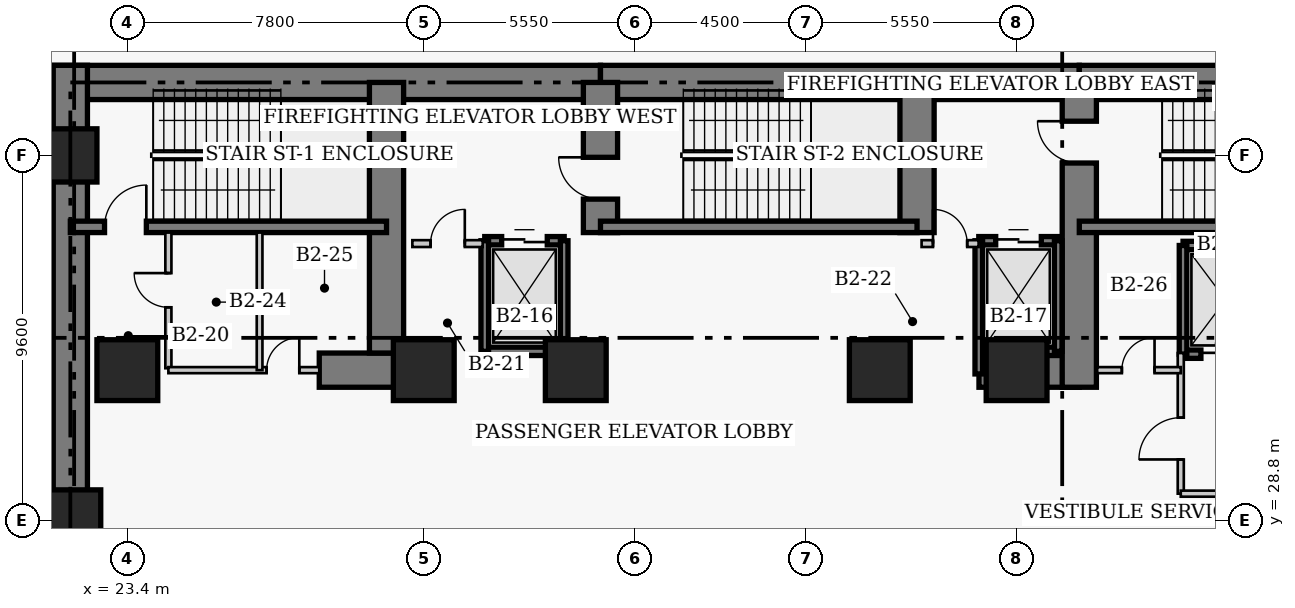
"""IFC4 building model, lengths in metres.
Left out: names, types, materials, properties, quantities, classifications, styles, units other than length and angle.
Written with IfcOpenShell. Run it as: python <this file> out.ifc"""

import sys

from ifc_helpers import new_model, si_unit, direction, frame, frame_2d, origin, origin_2d, place, context, subcontext, project, spatial, rectangle, extrude, element, fill, save


model = new_model("IFC4")
c1 = context("Model", 3, precision=1e-05, world=origin(), true_north=direction((0.0, 1.0)))
c2 = subcontext(c1, "Body", "Model", "MODEL_VIEW")
j1 = project(units=[si_unit("LENGTHUNIT", "METRE"), si_unit("PLANEANGLEUNIT", "RADIAN")], contexts=[c1])
p1 = place(None, origin())
s1 = spatial("IfcSite", under=j1, at=p1, CompositionType="ELEMENT")
p2 = place(p1, origin())
s2 = spatial("IfcBuilding", under=s1, at=p2, CompositionType="ELEMENT")
p3 = place(p2, frame((0.0, 0.0, -9.0)))
s3 = spatial("IfcBuildingStorey", under=s2, at=p3, CompositionType="ELEMENT", Elevation=-9.0)
p4 = place(p3, frame((21.45, 40.32, 0.0), z_axis=(0.0, 0.0, 1.0), x_axis=(1.0, 0.0, 0.0)))
e1 = element("IfcWall", 1, at=p4, inside=s3, PredefinedType="SHEAR", context=c2, shape_type="SweptSolid", body=[
    extrude(rectangle(XDim=14.4, YDim=0.9, at=frame_2d((7.2, 0.0))), origin(), (0.0, 0.0, 1.0), 4.5),
])
p5 = place(p3, frame((35.85, 40.32, 0.0), z_axis=(0.0, 0.0, 1.0), x_axis=(1.0, 0.0, 0.0)))
e2 = element("IfcWall", 2, at=p5, inside=s3, PredefinedType="SHEAR", context=c2, shape_type="SweptSolid", body=[
    extrude(rectangle(XDim=12.6, YDim=0.9, at=frame_2d((6.3, 0.0))), origin(), (0.0, 0.0, 1.0), 4.5),
])
p6 = place(p3, frame((48.45, 40.32, 0.0), z_axis=(0.0, 0.0, 1.0), x_axis=(1.0, 0.0, 0.0)))
e3 = element("IfcWall", 3, at=p6, inside=s3, PredefinedType="SHEAR", context=c2, shape_type="SweptSolid", body=[
    extrude(rectangle(XDim=8.97, YDim=0.9, at=frame_2d((4.485, 0.0))), origin(), (0.0, 0.0, 1.0), 4.5),
])
p7 = place(p3, frame((21.9, 27.05, 0.0), z_axis=(0.0, 0.0, 1.0), x_axis=(0.0, 1.0, 0.0)))
e4 = element("IfcWall", 4, at=p7, inside=s3, PredefinedType="SHEAR", context=c2, shape_type="SweptSolid", body=[
    extrude(rectangle(XDim=13.72, YDim=0.9, at=frame_2d((6.86, 0.0))), origin(), (0.0, 0.0, 1.0), 4.5),
])
p8 = place(p3, frame((28.45, 32.75, 0.0), z_axis=(0.0, 0.0, 1.0), x_axis=(1.0, 0.0, 0.0)))
e5 = element("IfcWall", 5, at=p8, inside=s3, PredefinedType="SHEAR", context=c2, shape_type="SweptSolid", body=[
    extrude(rectangle(XDim=2.4, YDim=0.9, at=frame_2d((1.2, 0.0))), origin(), (0.0, 0.0, 1.0), 4.5),
])
p9 = place(p3, frame((45.81, 32.75, 0.0), z_axis=(0.0, 0.0, 1.0), x_axis=(1.0, 0.0, 0.0)))
e6 = element("IfcWall", 6, at=p9, inside=s3, PredefinedType="SHEAR", context=c2, shape_type="SweptSolid", body=[
    extrude(rectangle(XDim=2.64, YDim=0.9, at=frame_2d((1.32, 0.0))), origin(), (0.0, 0.0, 1.0), 4.5),
])
p10 = place(p3, frame((30.22, 33.2, 0.0), z_axis=(0.0, 0.0, 1.0), x_axis=(0.0, 1.0, 0.0)))
e7 = element("IfcWall", 7, at=p10, inside=s3, PredefinedType="SHEAR", context=c2, shape_type="SweptSolid", body=[
    extrude(rectangle(XDim=7.12, YDim=0.9, at=frame_2d((3.56, 0.0))), origin(), (0.0, 0.0, 1.0), 4.5),
])
p11 = place(p3, frame((35.85, 36.37, 0.0), z_axis=(0.0, 0.0, 1.0), x_axis=(0.0, 1.0, 0.0)))
e8 = element("IfcWall", 8, at=p11, inside=s3, PredefinedType="SHEAR", context=c2, shape_type="SweptSolid", body=[
    extrude(rectangle(XDim=3.95, YDim=0.9, at=frame_2d((1.975, 0.0))), origin(), (0.0, 0.0, 1.0), 4.5),
])
p12 = place(p11, frame((0.88, 0.0, 0.0)))
e9 = element("IfcOpeningElement", 9, at=p12, cuts=e8, PredefinedType="OPENING", context=c2, shape_type="SweptSolid", body=[
    extrude(rectangle(XDim=1.1, YDim=2.15, at=frame_2d((0.55, 1.075))), frame((0.0, 0.46, 0.0), z_axis=(0.0, -1.0, 0.0), x_axis=(1.0, 0.0, 0.0)), (0.0, 0.0, 1.0), 0.92),
])
p13 = place(p3, frame((44.18, 36.37, 0.0), z_axis=(0.0, 0.0, 1.0), x_axis=(0.0, 1.0, 0.0)))
e10 = element("IfcWall", 10, at=p13, inside=s3, PredefinedType="SHEAR", context=c2, shape_type="SweptSolid", body=[
    extrude(rectangle(XDim=3.95, YDim=0.9, at=frame_2d((1.975, 0.0))), origin(), (0.0, 0.0, 1.0), 4.5),
])
p14 = place(p3, frame((48.45, 32.3, 0.0), z_axis=(0.0, 0.0, 1.0), x_axis=(0.0, 1.0, 0.0)))
e11 = element("IfcWall", 11, at=p14, inside=s3, PredefinedType="SHEAR", context=c2, shape_type="SweptSolid", body=[
    extrude(rectangle(XDim=8.02, YDim=0.9, at=frame_2d((4.01, 0.0))), origin(), (0.0, 0.0, 1.0), 4.5),
])
p15 = place(p14, frame((5.9, 0.0, 0.0)))
e12 = element("IfcOpeningElement", 12, at=p15, cuts=e11, PredefinedType="OPENING", context=c2, shape_type="SweptSolid", body=[
    extrude(rectangle(XDim=1.1, YDim=2.15, at=frame_2d((0.55, 1.075))), frame((0.0, 0.46, 0.0), z_axis=(0.0, -1.0, 0.0), x_axis=(1.0, 0.0, 0.0)), (0.0, 0.0, 1.0), 0.92),
])
p16 = place(p3, frame((21.9, 36.52, 0.0), z_axis=(0.0, 0.0, 1.0), x_axis=(1.0, 0.0, 0.0)))
e13 = element("IfcWall", 13, at=p16, inside=s3, PredefinedType="SHEAR", context=c2, shape_type="SweptSolid", body=[
    extrude(rectangle(XDim=8.32, YDim=0.3, at=frame_2d((4.16, 0.0))), origin(), (0.0, 0.0, 1.0), 4.5),
])
p17 = place(p16, frame((0.9, 0.0, 0.0)))
e14 = element("IfcOpeningElement", 14, at=p17, cuts=e13, PredefinedType="OPENING", context=c2, shape_type="SweptSolid", body=[
    extrude(rectangle(XDim=1.1, YDim=2.15, at=frame_2d((0.55, 1.075))), frame((0.0, 0.16, 0.0), z_axis=(0.0, -1.0, 0.0), x_axis=(1.0, 0.0, 0.0)), (0.0, 0.0, 1.0), 0.32),
])
p18 = place(p3, frame((35.85, 36.52, 0.0), z_axis=(0.0, 0.0, 1.0), x_axis=(1.0, 0.0, 0.0)))
e15 = element("IfcWall", 15, at=p18, inside=s3, PredefinedType="SHEAR", context=c2, shape_type="SweptSolid", body=[
    extrude(rectangle(XDim=8.33, YDim=0.3, at=frame_2d((4.165, 0.0))), origin(), (0.0, 0.0, 1.0), 4.5),
])
p19 = place(p3, frame((48.45, 36.52, 0.0), z_axis=(0.0, 0.0, 1.0), x_axis=(1.0, 0.0, 0.0)))
e16 = element("IfcWall", 16, at=p19, inside=s3, PredefinedType="SHEAR", context=c2, shape_type="SweptSolid", body=[
    extrude(rectangle(XDim=8.52, YDim=0.3, at=frame_2d((4.26, 0.0))), origin(), (0.0, 0.0, 1.0), 4.5),
])
p20 = place(p3, frame((21.9, 28.8, 0.0), z_axis=(0.0, 0.0, 1.0), x_axis=(1.0, 0.0, 0.0)))
e17 = element("IfcColumn", 17, at=p20, inside=s3, PredefinedType="COLUMN", context=c2, shape_type="SweptSolid", body=[
    extrude(rectangle(XDim=1.6, YDim=1.6, at=origin_2d()), origin(), (0.0, 0.0, 1.0), 4.5),
])
p21 = place(p3, frame((21.9, 38.4, 0.0), z_axis=(0.0, 0.0, 1.0), x_axis=(1.0, 0.0, 0.0)))
e18 = element("IfcColumn", 18, at=p21, inside=s3, PredefinedType="COLUMN", context=c2, shape_type="SweptSolid", body=[
    extrude(rectangle(XDim=1.4, YDim=1.4, at=origin_2d()), origin(), (0.0, 0.0, 1.0), 4.5),
])
for number, where, z_axis, x_axis in (
    (19, (23.4, 32.75, 0.0), (0.0, 0.0, 1.0), (1.0, 0.0, 0.0)),
    (20, (31.2, 32.75, 0.0), (0.0, 0.0, 1.0), (1.0, 0.0, 0.0)),
    (21, (35.2, 32.75, 0.0), (0.0, 0.0, 1.0), (1.0, 0.0, 0.0)),
    (22, (43.2, 32.75, 0.0), (0.0, 0.0, 1.0), (1.0, 0.0, 0.0)),
    (23, (46.8, 32.75, 0.0), (0.0, 0.0, 1.0), (1.0, 0.0, 0.0)),
):
    element("IfcColumn", number, at=place(p3, frame(where, z_axis=z_axis, x_axis=x_axis)), inside=s3, PredefinedType="COLUMN", context=c2, shape_type="SweptSolid", body=[
        extrude(rectangle(XDim=1.6, YDim=1.6, at=origin_2d()), origin(), (0.0, 0.0, 1.0), 4.5),
    ])
p22 = place(p3, frame((51.18, 36.03, 0.0), z_axis=(0.0, 0.0, 1.0), x_axis=(1.0, 0.0, 0.0)))
e24 = element("IfcWall", 24, at=p22, inside=s3, PredefinedType="SHEAR", context=c2, shape_type="SweptSolid", body=[
    extrude(rectangle(XDim=2.42, YDim=0.22, at=frame_2d((1.21, 0.0))), origin(), (0.0, 0.0, 1.0), 4.5),
])
p23 = place(p3, frame((51.18, 33.17, 0.0), z_axis=(0.0, 0.0, 1.0), x_axis=(1.0, 0.0, 0.0)))
e25 = element("IfcWall", 25, at=p23, inside=s3, PredefinedType="SHEAR", context=c2, shape_type="SweptSolid", body=[
    extrude(rectangle(XDim=2.42, YDim=0.22, at=frame_2d((1.21, 0.0))), origin(), (0.0, 0.0, 1.0), 4.5),
])
p24 = place(p23, frame((0.47, 0.0, 0.0)))
e26 = element("IfcOpeningElement", 26, at=p24, cuts=e25, PredefinedType="OPENING", context=c2, shape_type="SweptSolid", body=[
    extrude(rectangle(XDim=1.3, YDim=2.15, at=frame_2d((0.65, 1.075))), frame((0.0, 0.12, 0.0), z_axis=(0.0, -1.0, 0.0), x_axis=(1.0, 0.0, 0.0)), (0.0, 0.0, 1.0), 0.24),
])
p25 = place(p3, frame((51.18, 33.17, 0.0), z_axis=(0.0, 0.0, 1.0), x_axis=(0.0, 1.0, 0.0)))
e27 = element("IfcWall", 27, at=p25, inside=s3, PredefinedType="SHEAR", context=c2, shape_type="SweptSolid", body=[
    extrude(rectangle(XDim=2.86, YDim=0.2, at=frame_2d((1.43, 0.0))), origin(), (0.0, 0.0, 1.0), 4.5),
])
p26 = place(p3, frame((32.805, 36.155, 0.0), z_axis=(0.0, 0.0, 1.0), x_axis=(1.0, 0.0, 0.0)))
e28 = element("IfcWall", 28, at=p26, inside=s3, PredefinedType="SHEAR", context=c2, shape_type="SweptSolid", body=[
    extrude(rectangle(XDim=2.09, YDim=0.22, at=frame_2d((1.045, 0.0))), origin(), (0.0, 0.0, 1.0), 4.5),
])
p27 = place(p26, frame((0.445, 0.0, 0.0)))
e29 = element("IfcOpeningElement", 29, at=p27, cuts=e28, PredefinedType="OPENING", context=c2, shape_type="SweptSolid", body=[
    extrude(rectangle(XDim=1.2, YDim=2.15, at=frame_2d((0.6, 1.075))), frame((0.0, 0.12, 0.0), z_axis=(0.0, -1.0, 0.0), x_axis=(1.0, 0.0, 0.0)), (0.0, 0.0, 1.0), 0.24),
])
p28 = place(p3, frame((32.805, 33.245, 0.0), z_axis=(0.0, 0.0, 1.0), x_axis=(1.0, 0.0, 0.0)))
e30 = element("IfcWall", 30, at=p28, inside=s3, PredefinedType="SHEAR", context=c2, shape_type="SweptSolid", body=[
    extrude(rectangle(XDim=2.09, YDim=0.22, at=frame_2d((1.045, 0.0))), origin(), (0.0, 0.0, 1.0), 4.5),
])
for number, where, z_axis, x_axis in (
    (31, (32.805, 33.245, 0.0), (0.0, 0.0, 1.0), (0.0, 1.0, 0.0)),
    (32, (34.895, 33.245, 0.0), (0.0, 0.0, 1.0), (0.0, 1.0, 0.0)),
):
    element("IfcWall", number, at=place(p3, frame(where, z_axis=z_axis, x_axis=x_axis)), inside=s3, PredefinedType="SHEAR", context=c2, shape_type="SweptSolid", body=[
        extrude(rectangle(XDim=2.91, YDim=0.2, at=frame_2d((1.455, 0.0))), origin(), (0.0, 0.0, 1.0), 4.5),
    ])
p29 = place(p3, frame((45.805, 36.155, 0.0), z_axis=(0.0, 0.0, 1.0), x_axis=(1.0, 0.0, 0.0)))
e33 = element("IfcWall", 33, at=p29, inside=s3, PredefinedType="SHEAR", context=c2, shape_type="SweptSolid", body=[
    extrude(rectangle(XDim=2.09, YDim=0.22, at=frame_2d((1.045, 0.0))), origin(), (0.0, 0.0, 1.0), 4.5),
])
p30 = place(p29, frame((0.445, 0.0, 0.0)))
e34 = element("IfcOpeningElement", 34, at=p30, cuts=e33, PredefinedType="OPENING", context=c2, shape_type="SweptSolid", body=[
    extrude(rectangle(XDim=1.2, YDim=2.15, at=frame_2d((0.6, 1.075))), frame((0.0, 0.12, 0.0), z_axis=(0.0, -1.0, 0.0), x_axis=(1.0, 0.0, 0.0)), (0.0, 0.0, 1.0), 0.24),
])
p31 = place(p3, frame((45.805, 33.245, 0.0), z_axis=(0.0, 0.0, 1.0), x_axis=(1.0, 0.0, 0.0)))
e35 = element("IfcWall", 35, at=p31, inside=s3, PredefinedType="SHEAR", context=c2, shape_type="SweptSolid", body=[
    extrude(rectangle(XDim=2.09, YDim=0.22, at=frame_2d((1.045, 0.0))), origin(), (0.0, 0.0, 1.0), 4.5),
])
p32 = place(p3, frame((45.805, 32.65, 0.0), z_axis=(0.0, 0.0, 1.0), x_axis=(0.0, 1.0, 0.0)))
e36 = element("IfcWall", 36, at=p32, inside=s3, PredefinedType="SHEAR", context=c2, shape_type="SweptSolid", body=[
    extrude(rectangle(XDim=3.505, YDim=0.2, at=frame_2d((1.752, 0.0))), origin(), (0.0, 0.0, 1.0), 4.5),
])
p33 = place(p3, frame((47.895, 33.245, 0.0), z_axis=(0.0, 0.0, 1.0), x_axis=(0.0, 1.0, 0.0)))
e37 = element("IfcWall", 37, at=p33, inside=s3, PredefinedType="SHEAR", context=c2, shape_type="SweptSolid", body=[
    extrude(rectangle(XDim=2.91, YDim=0.2, at=frame_2d((1.455, 0.0))), origin(), (0.0, 0.0, 1.0), 4.5),
])
p34 = place(p3, frame((30.9, 36.08, 0.0), z_axis=(0.0, 0.0, 1.0), x_axis=(1.0, 0.0, 0.0)))
e38 = element("IfcWall", 38, at=p34, inside=s3, PredefinedType="PARTITIONING", context=c2, shape_type="SweptSolid", body=[
    extrude(rectangle(XDim=1.85, YDim=0.18, at=frame_2d((0.925, 0.0))), origin(), (0.0, 0.0, 1.0), 4.18),
])
p35 = place(p34, frame((0.48, 0.0, 0.0)))
e39 = element("IfcOpeningElement", 39, at=p35, cuts=e38, PredefinedType="OPENING", context=c2, shape_type="SweptSolid", body=[
    extrude(rectangle(XDim=0.9, YDim=2.15, at=frame_2d((0.45, 1.075))), frame((0.0, 0.1, 0.0), z_axis=(0.0, -1.0, 0.0), x_axis=(1.0, 0.0, 0.0)), (0.0, 0.0, 1.0), 0.2),
])
p36 = place(p3, frame((44.3, 36.08, 0.0), z_axis=(0.0, 0.0, 1.0), x_axis=(1.0, 0.0, 0.0)))
e40 = element("IfcWall", 40, at=p36, inside=s3, PredefinedType="PARTITIONING", context=c2, shape_type="SweptSolid", body=[
    extrude(rectangle(XDim=1.5, YDim=0.18, at=frame_2d((0.75, 0.0))), origin(), (0.0, 0.0, 1.0), 4.18),
])
p37 = place(p36, frame((0.3, 0.0, 0.0)))
e41 = element("IfcOpeningElement", 41, at=p37, cuts=e40, PredefinedType="OPENING", context=c2, shape_type="SweptSolid", body=[
    extrude(rectangle(XDim=0.9, YDim=2.15, at=frame_2d((0.45, 1.075))), frame((0.0, 0.1, 0.0), z_axis=(0.0, -1.0, 0.0), x_axis=(1.0, 0.0, 0.0)), (0.0, 0.0, 1.0), 0.2),
])
p38 = place(p3, frame((24.48, 32.8, 0.0), z_axis=(0.0, 0.0, 1.0), x_axis=(0.0, 1.0, 0.0)))
e42 = element("IfcWall", 42, at=p38, inside=s3, PredefinedType="PARTITIONING", context=c2, shape_type="SweptSolid", body=[
    extrude(rectangle(XDim=3.57, YDim=0.16, at=frame_2d((1.785, 0.0))), origin(), (0.0, 0.0, 1.0), 4.18),
])
p39 = place(p38, frame((1.604, 0.0, 0.0)))
e43 = element("IfcOpeningElement", 43, at=p39, cuts=e42, PredefinedType="OPENING", context=c2, shape_type="SweptSolid", body=[
    extrude(rectangle(XDim=0.9, YDim=2.1, at=frame_2d((0.45, 1.05))), frame((0.0, 0.09, 0.0), z_axis=(0.0, -1.0, 0.0), x_axis=(1.0, 0.0, 0.0)), (0.0, 0.0, 1.0), 0.18),
])
p40 = place(p3, frame((51.12, 29.5, 0.0), z_axis=(0.0, 0.0, 1.0), x_axis=(0.0, 1.0, 0.0)))
e44 = element("IfcWall", 44, at=p40, inside=s3, PredefinedType="PARTITIONING", context=c2, shape_type="SweptSolid", body=[
    extrude(rectangle(XDim=3.7, YDim=0.16, at=frame_2d((1.85, 0.0))), origin(), (0.0, 0.0, 1.0), 4.18),
])
p41 = place(p40, frame((0.9, 0.0, 0.0)))
e45 = element("IfcOpeningElement", 45, at=p41, cuts=e44, PredefinedType="OPENING", context=c2, shape_type="SweptSolid", body=[
    extrude(rectangle(XDim=1.1, YDim=2.15, at=frame_2d((0.55, 1.075))), frame((0.0, 0.09, 0.0), z_axis=(0.0, -1.0, 0.0), x_axis=(1.0, 0.0, 0.0)), (0.0, 0.0, 1.0), 0.18),
])
p42 = place(p3, frame((51.12, 29.5, 0.0), z_axis=(0.0, 0.0, 1.0), x_axis=(1.0, 0.0, 0.0)))
e46 = element("IfcWall", 46, at=p42, inside=s3, PredefinedType="PARTITIONING", context=c2, shape_type="SweptSolid", body=[
    extrude(rectangle(XDim=5.63, YDim=0.16, at=frame_2d((2.815, 0.0))), origin(), (0.0, 0.0, 1.0), 4.18),
])
p43 = place(p3, frame((24.48, 32.75, 0.0), z_axis=(0.0, 0.0, 1.0), x_axis=(1.0, 0.0, 0.0)))
e47 = element("IfcWall", 47, at=p43, inside=s3, PredefinedType="PARTITIONING", context=c2, shape_type="SweptSolid", body=[
    extrude(rectangle(XDim=3.97, YDim=0.16, at=frame_2d((1.985, 0.0))), origin(), (0.0, 0.0, 1.0), 4.18),
])
p44 = place(p43, frame((2.585, 0.0, 0.0)))
e48 = element("IfcOpeningElement", 48, at=p44, cuts=e47, PredefinedType="OPENING", context=c2, shape_type="SweptSolid", body=[
    extrude(rectangle(XDim=0.86, YDim=2.05, at=frame_2d((0.43, 1.025))), frame((0.0, 0.09, 0.0), z_axis=(0.0, -1.0, 0.0), x_axis=(1.0, 0.0, 0.0)), (0.0, 0.0, 1.0), 0.18),
])
p45 = place(p3, frame((48.92, 32.75, 0.0), z_axis=(0.0, 0.0, 1.0), x_axis=(1.0, 0.0, 0.0)))
e49 = element("IfcWall", 49, at=p45, inside=s3, PredefinedType="PARTITIONING", context=c2, shape_type="SweptSolid", body=[
    extrude(rectangle(XDim=2.2, YDim=0.16, at=frame_2d((1.1, 0.0))), origin(), (0.0, 0.0, 1.0), 4.18),
])
p46 = place(p45, frame((0.65, 0.0, 0.0)))
e50 = element("IfcOpeningElement", 50, at=p46, cuts=e49, PredefinedType="OPENING", context=c2, shape_type="SweptSolid", body=[
    extrude(rectangle(XDim=0.86, YDim=2.05, at=frame_2d((0.43, 1.025))), frame((0.0, 0.09, 0.0), z_axis=(0.0, -1.0, 0.0), x_axis=(1.0, 0.0, 0.0)), (0.0, 0.0, 1.0), 0.18),
])
p47 = place(p3, frame((26.88, 32.75, 0.0), z_axis=(0.0, 0.0, 1.0), x_axis=(0.0, 1.0, 0.0)))
e51 = element("IfcWall", 51, at=p47, inside=s3, PredefinedType="PARTITIONING", context=c2, shape_type="SweptSolid", body=[
    extrude(rectangle(XDim=3.62, YDim=0.15, at=frame_2d((1.81, 0.0))), origin(), (0.0, 0.0, 1.0), 4.18),
])
p48 = place(p24, origin())
e52 = element("IfcDoor", 52, at=p48, inside=s3, OperationType="DOUBLE_DOOR_SLIDING", PredefinedType="DOOR", context=c2, shape_type="SweptSolid", body=[
    extrude(rectangle(XDim=1.3, YDim=2.15, at=frame_2d((0.65, 1.075))), frame((0.0, 0.025, 0.0), z_axis=(0.0, -1.0, 0.0), x_axis=(1.0, 0.0, 0.0)), (0.0, 0.0, 1.0), 0.05),
])
fill(e26, e52)
p49 = place(p27, origin())
e53 = element("IfcDoor", 53, at=p49, inside=s3, OperationType="DOUBLE_DOOR_SLIDING", PredefinedType="DOOR", context=c2, shape_type="SweptSolid", body=[
    extrude(rectangle(XDim=1.2, YDim=2.15, at=frame_2d((0.6, 1.075))), frame((0.0, 0.025, 0.0), z_axis=(0.0, -1.0, 0.0), x_axis=(1.0, 0.0, 0.0)), (0.0, 0.0, 1.0), 0.05),
])
fill(e29, e53)
p50 = place(p30, origin())
e54 = element("IfcDoor", 54, at=p50, inside=s3, OperationType="DOUBLE_DOOR_SLIDING", PredefinedType="DOOR", context=c2, shape_type="SweptSolid", body=[
    extrude(rectangle(XDim=1.2, YDim=2.15, at=frame_2d((0.6, 1.075))), frame((0.0, 0.025, 0.0), z_axis=(0.0, -1.0, 0.0), x_axis=(1.0, 0.0, 0.0)), (0.0, 0.0, 1.0), 0.05),
])
fill(e34, e54)
p51 = place(p35, origin())
e55 = element("IfcDoor", 55, at=p51, inside=s3, OperationType="SINGLE_SWING_RIGHT", PredefinedType="DOOR", context=c2, shape_type="SweptSolid", body=[
    extrude(rectangle(XDim=0.9, YDim=2.15, at=frame_2d((0.45, 1.075))), frame((0.0, 0.025, 0.0), z_axis=(0.0, -1.0, 0.0), x_axis=(1.0, 0.0, 0.0)), (0.0, 0.0, 1.0), 0.05),
])
fill(e39, e55)
p52 = place(p37, origin())
e56 = element("IfcDoor", 56, at=p52, inside=s3, OperationType="SINGLE_SWING_LEFT", PredefinedType="DOOR", context=c2, shape_type="SweptSolid", body=[
    extrude(rectangle(XDim=0.9, YDim=2.15, at=frame_2d((0.45, 1.075))), frame((0.0, 0.025, 0.0), z_axis=(0.0, -1.0, 0.0), x_axis=(1.0, 0.0, 0.0)), (0.0, 0.0, 1.0), 0.05),
])
fill(e41, e56)
p53 = place(p41, origin())
e57 = element("IfcDoor", 57, at=p53, inside=s3, OperationType="SINGLE_SWING_LEFT", PredefinedType="DOOR", context=c2, shape_type="SweptSolid", body=[
    extrude(rectangle(XDim=1.1, YDim=2.15, at=frame_2d((0.55, 1.075))), frame((0.0, 0.025, 0.0), z_axis=(0.0, -1.0, 0.0), x_axis=(1.0, 0.0, 0.0)), (0.0, 0.0, 1.0), 0.05),
])
fill(e45, e57)
p54 = place(p39, origin())
e58 = element("IfcDoor", 58, at=p54, inside=s3, OperationType="SINGLE_SWING_RIGHT", PredefinedType="DOOR", context=c2, shape_type="SweptSolid", body=[
    extrude(rectangle(XDim=0.9, YDim=2.1, at=frame_2d((0.45, 1.05))), frame((0.0, 0.025, 0.0), z_axis=(0.0, -1.0, 0.0), x_axis=(1.0, 0.0, 0.0)), (0.0, 0.0, 1.0), 0.05),
])
fill(e43, e58)
p55 = place(p44, origin())
e59 = element("IfcDoor", 59, at=p55, inside=s3, OperationType="SINGLE_SWING_RIGHT", PredefinedType="DOOR", context=c2, shape_type="SweptSolid", body=[
    extrude(rectangle(XDim=0.86, YDim=2.05, at=frame_2d((0.43, 1.025))), frame((0.0, 0.025, 0.0), z_axis=(0.0, -1.0, 0.0), x_axis=(1.0, 0.0, 0.0)), (0.0, 0.0, 1.0), 0.05),
])
fill(e48, e59)
p56 = place(p46, origin())
e60 = element("IfcDoor", 60, at=p56, inside=s3, OperationType="SINGLE_SWING_RIGHT", PredefinedType="DOOR", context=c2, shape_type="SweptSolid", body=[
    extrude(rectangle(XDim=0.86, YDim=2.05, at=frame_2d((0.43, 1.025))), frame((0.0, 0.025, 0.0), z_axis=(0.0, -1.0, 0.0), x_axis=(1.0, 0.0, 0.0)), (0.0, 0.0, 1.0), 0.05),
])
fill(e50, e60)
p57 = place(p17, origin())
e61 = element("IfcDoor", 61, at=p57, inside=s3, OperationType="SINGLE_SWING_RIGHT", PredefinedType="DOOR", context=c2, shape_type="SweptSolid", body=[
    extrude(rectangle(XDim=1.1, YDim=2.15, at=frame_2d((0.55, 1.075))), frame((0.0, 0.025, 0.0), z_axis=(0.0, -1.0, 0.0), x_axis=(1.0, 0.0, 0.0)), (0.0, 0.0, 1.0), 0.05),
])
fill(e14, e61)
p58 = place(p12, origin())
e62 = element("IfcDoor", 62, at=p58, inside=s3, OperationType="SINGLE_SWING_RIGHT", PredefinedType="DOOR", context=c2, shape_type="SweptSolid", body=[
    extrude(rectangle(XDim=1.1, YDim=2.15, at=frame_2d((0.55, 1.075))), frame((0.0, 0.025, 0.0), z_axis=(0.0, -1.0, 0.0), x_axis=(1.0, 0.0, 0.0)), (0.0, 0.0, 1.0), 0.05),
])
fill(e9, e62)
p59 = place(p15, origin())
e63 = element("IfcDoor", 63, at=p59, inside=s3, OperationType="SINGLE_SWING_RIGHT", PredefinedType="DOOR", context=c2, shape_type="SweptSolid", body=[
    extrude(rectangle(XDim=1.1, YDim=2.15, at=frame_2d((0.55, 1.075))), frame((0.0, 0.025, 0.0), z_axis=(0.0, -1.0, 0.0), x_axis=(1.0, 0.0, 0.0)), (0.0, 0.0, 1.0), 0.05),
])
fill(e12, e63)
save(model, sys.argv[1])
